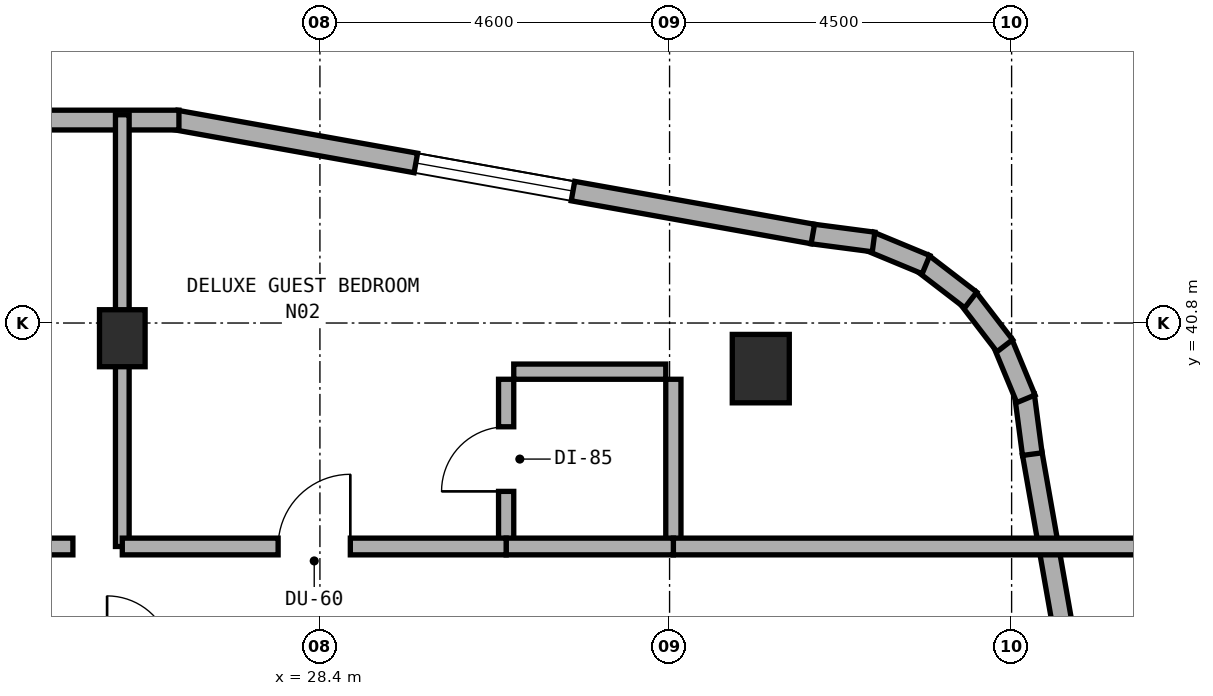
"""IFC4 building model, lengths in metres.
Left out: names, types, materials, properties, quantities, classifications, styles, units other than length and angle.
Written with IfcOpenShell. Run it as: python <this file> out.ifc"""

import sys

from ifc_helpers import new_model, si_unit, direction, frame, frame_2d, origin, origin_2d, place, context, subcontext, project, spatial, rectangle, extrude, element, fill, save


model = new_model("IFC4")
c1 = context("Model", 3, precision=1e-05, world=origin(), true_north=direction((0.0, 1.0)))
c2 = subcontext(c1, "Body", "Model", "MODEL_VIEW")
j1 = project(units=[si_unit("LENGTHUNIT", "METRE"), si_unit("PLANEANGLEUNIT", "RADIAN")], contexts=[c1])
p1 = place(None, origin())
s1 = spatial("IfcSite", under=j1, at=p1, CompositionType="ELEMENT")
p2 = place(p1, origin())
s2 = spatial("IfcBuilding", under=s1, at=p2, CompositionType="ELEMENT")
p3 = place(p2, frame((0.0, 0.0, 243.2)))
s3 = spatial("IfcBuildingStorey", under=s2, at=p3, CompositionType="ELEMENT", Elevation=243.2)
p4 = place(p3, frame((25.8, 40.6, 0.0), z_axis=(0.0, 0.0, 1.0), x_axis=(1.0, 0.0, 0.0)))
e1 = element("IfcColumn", 1, at=p4, inside=s3, PredefinedType="COLUMN", context=c2, shape_type="SweptSolid", body=[
    extrude(rectangle(XDim=0.6, YDim=0.75, at=origin_2d()), origin(), (0.0, 0.0, 1.0), 3.6),
])
p5 = place(p3, frame((34.2, 40.2, 0.0), z_axis=(0.0, 0.0, 1.0), x_axis=(1.0, 0.0, 0.0)))
e2 = element("IfcColumn", 2, at=p5, inside=s3, PredefinedType="COLUMN", context=c2, shape_type="SweptSolid", body=[
    extrude(rectangle(XDim=0.75, YDim=0.9, at=origin_2d()), origin(), (0.0, 0.0, 1.0), 3.6),
])
p6 = place(p3, frame((39.282, 30.503, 0.0), z_axis=(0.0, 0.0, 1.0), x_axis=(-0.173396937698, 0.984852020355, 0.0)))
e3 = element("IfcWall", 3, at=p6, inside=s3, PredefinedType="STANDARD", context=c2, shape_type="SweptSolid", body=[
    extrude(rectangle(XDim=8.714, YDim=0.26, at=frame_2d((4.357, 0.0))), origin(), (0.0, 0.0, 1.0), 3.32),
])
p7 = place(p6, frame((1.967, 0.0, 0.85)))
e4 = element("IfcOpeningElement", 4, at=p7, cuts=e3, PredefinedType="OPENING", context=c2, shape_type="SweptSolid", body=[
    extrude(rectangle(XDim=2.1, YDim=1.5, at=frame_2d((1.05, 0.75))), frame((0.0, 0.14, 0.0), z_axis=(0.0, -1.0, 0.0), x_axis=(1.0, 0.0, 0.0)), (0.0, 0.0, 1.0), 0.28),
])
p8 = place(p3, frame((37.772, 39.075, 0.0), z_axis=(0.0, 0.0, 1.0), x_axis=(-0.130689052056, 0.991423406861, 0.0)))
e5 = element("IfcWall", 5, at=p8, inside=s3, PredefinedType="STANDARD", context=c2, shape_type="SweptSolid", body=[
    extrude(rectangle(XDim=0.781, YDim=0.26, at=frame_2d((0.39, 0.0))), origin(), (0.0, 0.0, 1.0), 3.32),
])
p9 = place(p3, frame((37.688, 39.803, 0.0), z_axis=(0.0, 0.0, 1.0), x_axis=(-0.382900540965, 0.923789573295, 0.0)))
e6 = element("IfcWall", 6, at=p9, inside=s3, PredefinedType="STANDARD", context=c2, shape_type="SweptSolid", body=[
    extrude(rectangle(XDim=0.799, YDim=0.26, at=frame_2d((0.399, 0.0))), origin(), (0.0, 0.0, 1.0), 3.32),
])
p10 = place(p3, frame((37.41, 40.501, 0.0), z_axis=(0.0, 0.0, 1.0), x_axis=(-0.608823262828, 0.793305889705, 0.0)))
e7 = element("IfcWall", 7, at=p10, inside=s3, PredefinedType="STANDARD", context=c2, shape_type="SweptSolid", body=[
    extrude(rectangle(XDim=0.798, YDim=0.26, at=frame_2d((0.399, 0.0))), origin(), (0.0, 0.0, 1.0), 3.32),
])
p11 = place(p3, frame((36.962, 41.103, 0.0), z_axis=(0.0, 0.0, 1.0), x_axis=(-0.793044635519, 0.60916352983, 0.0)))
e8 = element("IfcWall", 8, at=p11, inside=s3, PredefinedType="STANDARD", context=c2, shape_type="SweptSolid", body=[
    extrude(rectangle(XDim=0.798, YDim=0.26, at=frame_2d((0.399, 0.0))), origin(), (0.0, 0.0, 1.0), 3.32),
])
p12 = place(p3, frame((36.373, 41.568, 0.0), z_axis=(0.0, 0.0, 1.0), x_axis=(-0.923789573295, 0.382900540965, 0.0)))
e9 = element("IfcWall", 9, at=p12, inside=s3, PredefinedType="STANDARD", context=c2, shape_type="SweptSolid", body=[
    extrude(rectangle(XDim=0.799, YDim=0.26, at=frame_2d((0.399, 0.0))), origin(), (0.0, 0.0, 1.0), 3.32),
])
p13 = place(p3, frame((35.684, 41.866, 0.0), z_axis=(0.0, 0.0, 1.0), x_axis=(-0.99153354416, 0.129850802102, 0.0)))
e10 = element("IfcWall", 10, at=p13, inside=s3, PredefinedType="STANDARD", context=c2, shape_type="SweptSolid", body=[
    extrude(rectangle(XDim=0.816, YDim=0.26, at=frame_2d((0.408, 0.0))), origin(), (0.0, 0.0, 1.0), 3.32),
])
p14 = place(p3, frame((34.885, 41.971, 0.0), z_axis=(0.0, 0.0, 1.0), x_axis=(-0.984367239349, 0.176128186549, 0.0)))
e11 = element("IfcWall", 11, at=p14, inside=s3, PredefinedType="STANDARD", context=c2, shape_type="SweptSolid", body=[
    extrude(rectangle(XDim=8.511, YDim=0.26, at=frame_2d((4.255, 0.0))), origin(), (0.0, 0.0, 1.0), 3.32),
])
p15 = place(p14, frame((3.206, 0.0, 0.85)))
e12 = element("IfcOpeningElement", 12, at=p15, cuts=e11, PredefinedType="OPENING", context=c2, shape_type="SweptSolid", body=[
    extrude(rectangle(XDim=2.1, YDim=1.5, at=frame_2d((1.05, 0.75))), frame((0.0, 0.14, 0.0), z_axis=(0.0, -1.0, 0.0), x_axis=(1.0, 0.0, 0.0)), (0.0, 0.0, 1.0), 0.28),
])
p16 = place(p3, frame((26.545, 43.47, 0.0), z_axis=(0.0, 0.0, 1.0), x_axis=(-1.0, 0.0, 0.0)))
e13 = element("IfcWall", 13, at=p16, inside=s3, PredefinedType="STANDARD", context=c2, shape_type="SweptSolid", body=[
    extrude(rectangle(XDim=11.055, YDim=0.26, at=frame_2d((5.527, 0.0))), origin(), (0.0, 0.0, 1.0), 3.32),
])
p17 = place(p16, frame((4.945, 0.0, 0.0)))
e14 = element("IfcOpeningElement", 14, at=p17, cuts=e13, PredefinedType="OPENING", context=c2, shape_type="SweptSolid", body=[
    extrude(rectangle(XDim=1.2, YDim=2.15, at=frame_2d((0.6, 1.075))), frame((0.0, 0.14, 0.0), z_axis=(0.0, -1.0, 0.0), x_axis=(1.0, 0.0, 0.0)), (0.0, 0.0, 1.0), 0.28),
])
p18 = place(p16, frame((1.72, 0.0, 0.85)))
e15 = element("IfcOpeningElement", 15, at=p18, cuts=e13, PredefinedType="OPENING", context=c2, shape_type="SweptSolid", body=[
    extrude(rectangle(XDim=2.1, YDim=1.5, at=frame_2d((1.05, 0.75))), frame((0.0, 0.14, 0.0), z_axis=(0.0, -1.0, 0.0), x_axis=(1.0, 0.0, 0.0)), (0.0, 0.0, 1.0), 0.28),
])
p19 = place(p16, frame((7.695, 0.0, 0.85)))
e16 = element("IfcOpeningElement", 16, at=p19, cuts=e13, PredefinedType="OPENING", context=c2, shape_type="SweptSolid", body=[
    extrude(rectangle(XDim=2.1, YDim=1.5, at=frame_2d((1.05, 0.75))), frame((0.0, 0.14, 0.0), z_axis=(0.0, -1.0, 0.0), x_axis=(1.0, 0.0, 0.0)), (0.0, 0.0, 1.0), 0.28),
])
p20 = place(p3, frame((19.85, 37.86, 0.0), z_axis=(0.0, 0.0, 1.0), x_axis=(1.0, 0.0, 0.0)))
e17 = element("IfcWall", 17, at=p20, inside=s3, PredefinedType="SOLIDWALL", context=c2, shape_type="SweptSolid", body=[
    extrude(rectangle(XDim=5.3, YDim=0.22, at=frame_2d((2.65, 0.0))), origin(), (0.0, 0.0, 1.0), 3.32),
])
p21 = place(p20, frame((1.88, 0.0, 0.0)))
e18 = element("IfcOpeningElement", 18, at=p21, cuts=e17, PredefinedType="OPENING", context=c2, shape_type="SweptSolid", body=[
    extrude(rectangle(XDim=1.1, YDim=2.1, at=frame_2d((0.55, 1.05))), frame((0.0, 0.12, 0.0), z_axis=(0.0, -1.0, 0.0), x_axis=(1.0, 0.0, 0.0)), (0.0, 0.0, 1.0), 0.24),
])
p22 = place(p3, frame((25.8, 37.86, 0.0), z_axis=(0.0, 0.0, 1.0), x_axis=(0.0, 1.0, 0.0)))
e19 = element("IfcWall", 19, at=p22, inside=s3, PredefinedType="SOLIDWALL", context=c2, shape_type="SweptSolid", body=[
    extrude(rectangle(XDim=5.68, YDim=0.18, at=frame_2d((2.84, 0.0))), origin(), (0.0, 0.0, 1.0), 2.745),
])
p23 = place(p3, frame((30.85, 37.96, 0.0), z_axis=(0.0, 0.0, 1.0), x_axis=(0.0, 1.0, 0.0)))
e20 = element("IfcWall", 20, at=p23, inside=s3, PredefinedType="PLUMBINGWALL", context=c2, shape_type="SweptSolid", body=[
    extrude(rectangle(XDim=2.1, YDim=0.2, at=frame_2d((1.05, 0.0))), origin(), (0.0, 0.0, 1.0), 2.995),
])
p24 = place(p23, frame((0.625, 0.0, 0.0)))
e21 = element("IfcOpeningElement", 21, at=p24, cuts=e20, PredefinedType="OPENING", context=c2, shape_type="SweptSolid", body=[
    extrude(rectangle(XDim=0.85, YDim=2.1, at=frame_2d((0.425, 1.05))), frame((0.0, 0.11, 0.0), z_axis=(0.0, -1.0, 0.0), x_axis=(1.0, 0.0, 0.0)), (0.0, 0.0, 1.0), 0.22),
])
p25 = place(p3, frame((30.95, 40.16, 0.0), z_axis=(0.0, 0.0, 1.0), x_axis=(1.0, 0.0, 0.0)))
e22 = element("IfcWall", 22, at=p25, inside=s3, PredefinedType="PLUMBINGWALL", context=c2, shape_type="SweptSolid", body=[
    extrude(rectangle(XDim=2.0, YDim=0.2, at=frame_2d((1.0, 0.0))), origin(), (0.0, 0.0, 1.0), 3.015),
])
p26 = place(p3, frame((33.05, 37.96, 0.0), z_axis=(0.0, 0.0, 1.0), x_axis=(0.0, 1.0, 0.0)))
e23 = element("IfcWall", 23, at=p26, inside=s3, PredefinedType="PLUMBINGWALL", context=c2, shape_type="SweptSolid", body=[
    extrude(rectangle(XDim=2.1, YDim=0.2, at=frame_2d((1.05, 0.0))), origin(), (0.0, 0.0, 1.0), 2.995),
])
p27 = place(p3, frame((33.05, 37.86, 0.0), z_axis=(0.0, 0.0, 1.0), x_axis=(1.0, 0.0, 0.0)))
e24 = element("IfcWall", 24, at=p27, inside=s3, PredefinedType="SOLIDWALL", context=c2, shape_type="SweptSolid", body=[
    extrude(rectangle(XDim=6.19, YDim=0.22, at=frame_2d((3.095, 0.0))), origin(), (0.0, 0.0, 1.0), 2.745),
])
p28 = place(p3, frame((30.85, 37.86, 0.0), z_axis=(0.0, 0.0, 1.0), x_axis=(1.0, 0.0, 0.0)))
e25 = element("IfcWall", 25, at=p28, inside=s3, PredefinedType="SOLIDWALL", context=c2, shape_type="SweptSolid", body=[
    extrude(rectangle(XDim=2.2, YDim=0.22, at=frame_2d((1.1, 0.0))), origin(), (0.0, 0.0, 1.0), 3.32),
])
p29 = place(p3, frame((25.8, 37.86, 0.0), z_axis=(0.0, 0.0, 1.0), x_axis=(1.0, 0.0, 0.0)))
e26 = element("IfcWall", 26, at=p29, inside=s3, PredefinedType="SOLIDWALL", context=c2, shape_type="SweptSolid", body=[
    extrude(rectangle(XDim=5.05, YDim=0.22, at=frame_2d((2.525, 0.0))), origin(), (0.0, 0.0, 1.0), 2.745),
])
p30 = place(p29, frame((2.05, 0.0, 0.0)))
e27 = element("IfcOpeningElement", 27, at=p30, cuts=e26, PredefinedType="OPENING", context=c2, shape_type="SweptSolid", body=[
    extrude(rectangle(XDim=0.95, YDim=2.1, at=frame_2d((0.475, 1.05))), frame((0.0, 0.12, 0.0), z_axis=(0.0, -1.0, 0.0), x_axis=(1.0, 0.0, 0.0)), (0.0, 0.0, 1.0), 0.24),
])
p31 = place(p15, origin())
e28 = element("IfcWindow", 28, at=p31, inside=s3, PartitioningType="SINGLE_PANEL", PredefinedType="WINDOW", context=c2, shape_type="SweptSolid", body=[
    extrude(rectangle(XDim=2.1, YDim=1.5, at=frame_2d((1.05, 0.75))), frame((0.0, 0.03, 0.0), z_axis=(0.0, -1.0, 0.0), x_axis=(1.0, 0.0, 0.0)), (0.0, 0.0, 1.0), 0.06),
])
fill(e12, e28)
p32 = place(p24, origin())
e29 = element("IfcDoor", 29, at=p32, inside=s3, OperationType="SINGLE_SWING_LEFT", PredefinedType="DOOR", context=c2, shape_type="SweptSolid", body=[
    extrude(rectangle(XDim=0.85, YDim=2.1, at=frame_2d((0.425, 1.05))), frame((0.0, 0.025, 0.0), z_axis=(0.0, -1.0, 0.0), x_axis=(1.0, 0.0, 0.0)), (0.0, 0.0, 1.0), 0.05),
])
fill(e21, e29)
p33 = place(p30, origin())
e30 = element("IfcDoor", 30, at=p33, inside=s3, OperationType="SINGLE_SWING_RIGHT", PredefinedType="DOOR", context=c2, shape_type="SweptSolid", body=[
    extrude(rectangle(XDim=0.95, YDim=2.1, at=frame_2d((0.475, 1.05))), frame((0.0, 0.025, 0.0), z_axis=(0.0, -1.0, 0.0), x_axis=(1.0, 0.0, 0.0)), (0.0, 0.0, 1.0), 0.05),
])
fill(e27, e30)
save(model, sys.argv[1])
